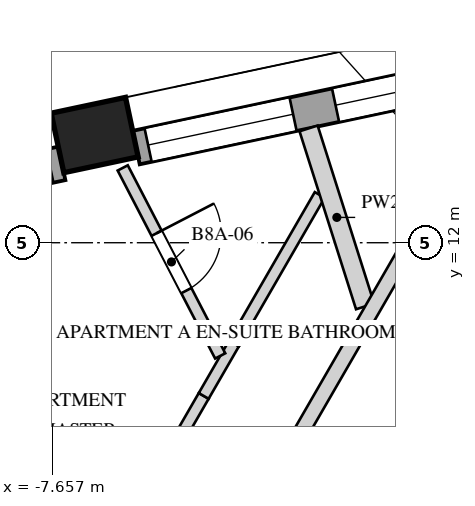
"""IFC4 building model, lengths in metres.
Left out: names, types, materials, properties, quantities, classifications, styles, units other than length and angle.
Written with IfcOpenShell. Run it as: python <this file> out.ifc"""

import sys

from ifc_helpers import new_model, si_unit, direction, frame, frame_2d, origin, origin_2d, place, context, subcontext, project, spatial, rectangle, extrude, element, fill, save


model = new_model("IFC4")
c1 = context("Model", 3, precision=1e-05, world=origin(), true_north=direction((0.0, 1.0)))
c2 = subcontext(c1, "Body", "Model", "MODEL_VIEW")
j1 = project(units=[si_unit("LENGTHUNIT", "METRE"), si_unit("PLANEANGLEUNIT", "RADIAN")], contexts=[c1])
p1 = place(None, origin())
s1 = spatial("IfcSite", under=j1, at=p1, CompositionType="ELEMENT")
p2 = place(p1, origin())
s2 = spatial("IfcBuilding", under=s1, at=p2, CompositionType="ELEMENT")
p3 = place(p2, frame((0.0, 0.0, 320.4)))
s3 = spatial("IfcBuildingStorey", under=s2, at=p3, CompositionType="ELEMENT", Elevation=320.4)
p4 = place(p3, frame((-1.285, 10.725, 0.0), z_axis=(0.0, 0.0, 1.0), x_axis=(-0.499994590896, -0.86602852671, 0.0)))
e1 = element("IfcWall", 1, at=p4, inside=s3, PredefinedType="SHEAR", context=c2, shape_type="SweptSolid", body=[
    extrude(rectangle(XDim=17.292, YDim=0.55, at=frame_2d((8.646, 0.0))), origin(), (0.0, 0.0, 1.0), 4.0),
])
p5 = place(p4, frame((6.851, 0.0, 0.0)))
e2 = element("IfcOpeningElement", 2, at=p5, cuts=e1, PredefinedType="OPENING", context=c2, shape_type="SweptSolid", body=[
    extrude(rectangle(XDim=1.0, YDim=2.4, at=frame_2d((0.5, 1.2))), frame((0.0, 0.285, 0.0), z_axis=(0.0, -1.0, 0.0), x_axis=(1.0, 0.0, 0.0)), (0.0, 0.0, 1.0), 0.57),
])
p6 = place(p4, frame((15.089, 0.0, 0.0)))
e3 = element("IfcOpeningElement", 3, at=p6, cuts=e1, PredefinedType="OPENING", context=c2, shape_type="SweptSolid", body=[
    extrude(rectangle(XDim=0.8, YDim=2.1, at=frame_2d((0.4, 1.05))), frame((0.0, 0.285, 0.0), z_axis=(0.0, -1.0, 0.0), x_axis=(1.0, 0.0, 0.0)), (0.0, 0.0, 1.0), 0.57),
])
p7 = place(p3, frame((-7.102, 13.417, -0.35), z_axis=(0.0, 0.0, 1.0), x_axis=(-0.978147600734, -0.207911690818, 0.0)))
e4 = element("IfcColumn", 4, at=p7, inside=s3, PredefinedType="COLUMN", context=c2, shape_type="SweptSolid", body=[
    extrude(rectangle(XDim=1.0, YDim=0.8, at=origin_2d()), origin(), (0.0, 0.0, 1.0), 4.35),
])
p8 = place(p3, frame((0.599, 14.772, 0.0), z_axis=(0.0, 0.0, 1.0), x_axis=(-0.978151299843, -0.207894287118, 0.0)))
e5 = element("IfcWall", 5, at=p8, inside=s3, PredefinedType="SOLIDWALL", context=c2, shape_type="SweptSolid", body=[
    extrude(rectangle(XDim=7.314, YDim=0.45, at=frame_2d((3.657, 0.0))), origin(), (0.0, 0.0, 1.0), 3.3),
])
p9 = place(p8, frame((0.161, 0.0, 0.4)))
e6 = element("IfcOpeningElement", 6, at=p9, cuts=e5, PredefinedType="OPENING", context=c2, shape_type="SweptSolid", body=[
    extrude(rectangle(XDim=1.95, YDim=2.75, at=frame_2d((0.975, 1.375))), frame((0.0, 0.235, 0.0), z_axis=(0.0, -1.0, 0.0), x_axis=(1.0, 0.0, 0.0)), (0.0, 0.0, 1.0), 0.47),
])
p10 = place(p8, frame((2.682, 0.0, 0.4)))
e7 = element("IfcOpeningElement", 7, at=p10, cuts=e5, PredefinedType="OPENING", context=c2, shape_type="SweptSolid", body=[
    extrude(rectangle(XDim=1.95, YDim=2.75, at=frame_2d((0.975, 1.375))), frame((0.0, 0.235, 0.0), z_axis=(0.0, -1.0, 0.0), x_axis=(1.0, 0.0, 0.0)), (0.0, 0.0, 1.0), 0.47),
])
p11 = place(p8, frame((5.203, 0.0, 0.4)))
e8 = element("IfcOpeningElement", 8, at=p11, cuts=e5, PredefinedType="OPENING", context=c2, shape_type="SweptSolid", body=[
    extrude(rectangle(XDim=1.95, YDim=2.75, at=frame_2d((0.975, 1.375))), frame((0.0, 0.235, 0.0), z_axis=(0.0, -1.0, 0.0), x_axis=(1.0, 0.0, 0.0)), (0.0, 0.0, 1.0), 0.47),
])
p12 = place(p3, frame((-7.533, 13.044, 0.0), z_axis=(0.0, 0.0, 1.0), x_axis=(-0.978153386925, -0.207884467067, 0.0)))
e9 = element("IfcWall", 9, at=p12, inside=s3, PredefinedType="SOLIDWALL", context=c2, shape_type="SweptSolid", body=[
    extrude(rectangle(XDim=2.271, YDim=0.45, at=frame_2d((1.136, 0.0))), origin(), (0.0, 0.0, 1.0), 3.3),
])
p13 = place(p12, frame((0.161, 0.0, 0.4)))
e10 = element("IfcOpeningElement", 10, at=p13, cuts=e9, PredefinedType="OPENING", context=c2, shape_type="SweptSolid", body=[
    extrude(rectangle(XDim=1.95, YDim=2.75, at=frame_2d((0.975, 1.375))), frame((0.0, 0.235, 0.0), z_axis=(0.0, -1.0, 0.0), x_axis=(1.0, 0.0, 0.0)), (0.0, 0.0, 1.0), 0.47),
])
p14 = place(p3, frame((-0.918, 9.86, 0.0), z_axis=(0.0, 0.0, 1.0), x_axis=(-0.500026960575, -0.86600983753, 0.0)))
e11 = element("IfcWall", 11, at=p14, inside=s3, PredefinedType="SOLIDWALL", context=c2, shape_type="SweptSolid", body=[
    extrude(rectangle(XDim=6.2, YDim=0.75, at=frame_2d((3.1, 0.0))), origin(), (0.0, 0.0, 1.0), 3.65),
])
p15 = place(p3, frame((-7.727, 6.417, 0.0), z_axis=(0.0, 0.0, 1.0), x_axis=(0.50002680699, 0.866009926209, 0.0)))
e12 = element("IfcWall", 12, at=p15, inside=s3, PredefinedType="PARTITIONING", context=c2, shape_type="SweptSolid", body=[
    extrude(rectangle(XDim=4.12, YDim=0.15, at=frame_2d((2.06, 0.0))), origin(), (0.0, 0.0, 1.0), 3.65),
])
p16 = place(p15, frame((1.561, 0.0, 0.0)))
e13 = element("IfcOpeningElement", 13, at=p16, cuts=e12, PredefinedType="OPENING", context=c2, shape_type="SweptSolid", body=[
    extrude(rectangle(XDim=0.95, YDim=2.4, at=frame_2d((0.475, 1.2))), frame((0.0, 0.085, 0.0), z_axis=(0.0, -1.0, 0.0), x_axis=(1.0, 0.0, 0.0)), (0.0, 0.0, 1.0), 0.17),
])
p17 = place(p3, frame((-5.667, 9.985, 0.0), z_axis=(0.0, 0.0, 1.0), x_axis=(0.499961121316, 0.86604784924, 0.0)))
e14 = element("IfcWall", 14, at=p17, inside=s3, PredefinedType="PARTITIONING", context=c2, shape_type="SweptSolid", body=[
    extrude(rectangle(XDim=0.797, YDim=0.15, at=frame_2d((0.398, 0.0))), origin(), (0.0, 0.0, 1.0), 2.95),
])
p18 = place(p3, frame((-5.268, 10.675, 0.0), z_axis=(0.0, 0.0, 1.0), x_axis=(0.499956642393, 0.866050434864, 0.0)))
e15 = element("IfcWall", 15, at=p18, inside=s3, PredefinedType="PARTITIONING", context=c2, shape_type="SweptSolid", body=[
    extrude(rectangle(XDim=2.256, YDim=0.15, at=frame_2d((1.128, 0.0))), origin(), (0.0, 0.0, 1.0), 3.65),
])
p19 = place(p3, frame((-6.732, 12.984, 0.0), z_axis=(0.0, 0.0, 1.0), x_axis=(0.460309491074, -0.887758510197, 0.0)))
e16 = element("IfcWall", 16, at=p19, inside=s3, PredefinedType="PARTITIONING", context=c2, shape_type="SweptSolid", body=[
    extrude(rectangle(XDim=2.786, YDim=0.15, at=frame_2d((1.393, 0.0))), origin(), (0.0, 0.0, 1.0), 2.95),
])
p20 = place(p19, frame((0.968, 0.0, 0.0)))
e17 = element("IfcOpeningElement", 17, at=p20, cuts=e16, PredefinedType="OPENING", context=c2, shape_type="SweptSolid", body=[
    extrude(rectangle(XDim=0.85, YDim=2.4, at=frame_2d((0.425, 1.2))), frame((0.0, 0.085, 0.0), z_axis=(0.0, -1.0, 0.0), x_axis=(1.0, 0.0, 0.0)), (0.0, 0.0, 1.0), 0.17),
])
p21 = place(p3, frame((-4.287, 13.504, 0.0), z_axis=(0.0, 0.0, 1.0), x_axis=(0.302510346388, -0.95314610125, 0.0)))
e18 = element("IfcWall", 18, at=p21, inside=s3, PredefinedType="SOLIDWALL", context=c2, shape_type="SweptSolid", body=[
    extrude(rectangle(XDim=2.457, YDim=0.25, at=frame_2d((1.228, 0.0))), origin(), (0.0, 0.0, 1.0), 3.65),
])
p22 = place(p3, frame((-4.515, 9.279, 0.0), z_axis=(0.0, 0.0, 1.0), x_axis=(0.499975428181, 0.866039589866, 0.0)))
e19 = element("IfcWall", 19, at=p22, inside=s3, PredefinedType="SOLIDWALL", context=c2, shape_type="SweptSolid", body=[
    extrude(rectangle(XDim=4.066, YDim=0.2, at=frame_2d((2.033, 0.0))), origin(), (0.0, 0.0, 1.0), 3.65),
])
p23 = place(p10, origin())
e20 = element("IfcWindow", 20, at=p23, inside=s3, PartitioningType="SINGLE_PANEL", PredefinedType="WINDOW", context=c2, shape_type="SweptSolid", body=[
    extrude(rectangle(XDim=1.95, YDim=2.75, at=frame_2d((0.975, 1.375))), frame((0.0, 0.03, 0.0), z_axis=(0.0, -1.0, 0.0), x_axis=(1.0, 0.0, 0.0)), (0.0, 0.0, 1.0), 0.06),
])
fill(e7, e20)
p24 = place(p11, origin())
e21 = element("IfcWindow", 21, at=p24, inside=s3, PartitioningType="SINGLE_PANEL", PredefinedType="WINDOW", context=c2, shape_type="SweptSolid", body=[
    extrude(rectangle(XDim=1.95, YDim=2.75, at=frame_2d((0.975, 1.375))), frame((0.0, 0.03, 0.0), z_axis=(0.0, -1.0, 0.0), x_axis=(1.0, 0.0, 0.0)), (0.0, 0.0, 1.0), 0.06),
])
fill(e8, e21)
p25 = place(p20, origin())
e22 = element("IfcDoor", 22, at=p25, inside=s3, OperationType="SINGLE_SWING_RIGHT", PredefinedType="DOOR", context=c2, shape_type="SweptSolid", body=[
    extrude(rectangle(XDim=0.85, YDim=2.4, at=frame_2d((0.425, 1.2))), frame((0.0, 0.025, 0.0), z_axis=(0.0, -1.0, 0.0), x_axis=(1.0, 0.0, 0.0)), (0.0, 0.0, 1.0), 0.05),
])
fill(e17, e22)
save(model, sys.argv[1])
